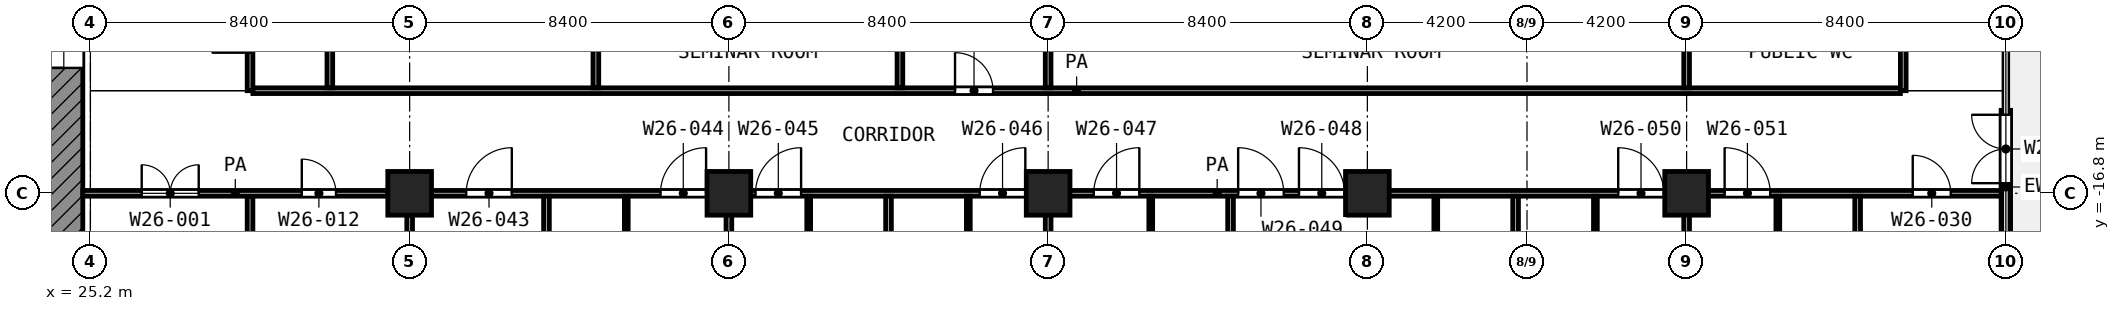
"""IFC4 building model, lengths in metres.
Left out: names, types, materials, properties, quantities, classifications, styles, units other than length and angle.
Written with IfcOpenShell. Run it as: python <this file> out.ifc"""

import sys

from ifc_helpers import new_model, si_unit, direction, frame, frame_2d, origin, origin_2d, place, context, subcontext, project, spatial, rectangle, extrude, element, fill, save


model = new_model("IFC4")
c1 = context("Model", 3, precision=1e-05, world=origin(), true_north=direction((0.0, 1.0)))
c2 = subcontext(c1, "Body", "Model", "MODEL_VIEW")
j1 = project(units=[si_unit("LENGTHUNIT", "METRE"), si_unit("PLANEANGLEUNIT", "RADIAN")], contexts=[c1])
p1 = place(None, origin())
s1 = spatial("IfcSite", under=j1, at=p1, CompositionType="ELEMENT")
p2 = place(p1, origin())
s2 = spatial("IfcBuilding", under=s1, at=p2, CompositionType="ELEMENT")
p3 = place(p2, frame((0.0, 0.0, 115.6)))
s3 = spatial("IfcBuildingStorey", under=s2, at=p3, CompositionType="ELEMENT", Elevation=115.6)
for number, where, z_axis, x_axis in (
    (1, (33.6, -16.8, 0.0), (0.0, 0.0, 1.0), (1.0, 0.0, 0.0)),
    (2, (42.0, -16.8, 0.0), (0.0, 0.0, 1.0), (1.0, 0.0, 0.0)),
    (3, (50.4, -16.8, 0.0), (0.0, 0.0, 1.0), (1.0, 0.0, 0.0)),
    (4, (58.8, -16.8, 0.0), (0.0, 0.0, 1.0), (1.0, 0.0, 0.0)),
    (5, (67.2, -16.8, 0.0), (0.0, 0.0, 1.0), (1.0, 0.0, 0.0)),
):
    element("IfcColumn", number, at=place(p3, frame(where, z_axis=z_axis, x_axis=x_axis)), inside=s3, PredefinedType="COLUMN", context=c2, shape_type="SweptSolid", body=[
        extrude(rectangle(XDim=1.15, YDim=1.15, at=origin_2d()), origin(), (0.0, 0.0, 1.0), 4.2),
    ])
p4 = place(p3, frame((75.6, -18.65, 0.0), z_axis=(0.0, 0.0, 1.0), x_axis=(0.0, 1.0, 0.0)))
e6 = element("IfcWall", 6, at=p4, inside=s3, PredefinedType="SOLIDWALL", context=c2, shape_type="SweptSolid", body=[
    extrude(rectangle(XDim=4.033, YDim=0.25, at=frame_2d((2.017, 0.0))), origin(), (0.0, 0.0, 1.0), 3.48),
])
p5 = place(p4, frame((2.117, 0.0, 0.0)))
e7 = element("IfcOpeningElement", 7, at=p5, cuts=e6, PredefinedType="OPENING", context=c2, shape_type="SweptSolid", body=[
    extrude(rectangle(XDim=1.8, YDim=2.1, at=frame_2d((0.9, 1.05))), frame((0.0, 0.135, 0.0), z_axis=(0.0, -1.0, 0.0), x_axis=(1.0, 0.0, 0.0)), (0.0, 0.0, 1.0), 0.27),
])
p6 = place(p3, frame((24.5, -24.0, 0.0), z_axis=(0.0, 0.0, 1.0), x_axis=(0.0, 1.0, 0.0)))
e8 = element("IfcWall", 8, at=p6, inside=s3, PredefinedType="SHEAR", context=c2, shape_type="SweptSolid", body=[
    extrude(rectangle(XDim=18.6, YDim=1.0, at=frame_2d((9.3, 0.0))), origin(), (0.0, 0.0, 1.0), 3.6),
])
p7 = place(p6, frame((10.5, 0.0, 0.0)))
e9 = element("IfcOpeningElement", 9, at=p7, cuts=e8, PredefinedType="OPENING", context=c2, shape_type="SweptSolid", body=[
    extrude(rectangle(XDim=1.8, YDim=2.1, at=frame_2d((0.9, 1.05))), frame((0.0, 0.51, 0.0), z_axis=(0.0, -1.0, 0.0), x_axis=(1.0, 0.0, 0.0)), (0.0, 0.0, 1.0), 1.02),
])
for number, where, z_axis, x_axis in (
    (10, (39.3, -20.1, 0.0), (0.0, 0.0, 1.0), (0.0, 1.0, 0.0)),
    (11, (44.1, -20.1, 0.0), (0.0, 0.0, 1.0), (0.0, 1.0, 0.0)),
    (12, (48.3, -20.1, 0.0), (0.0, 0.0, 1.0), (0.0, 1.0, 0.0)),
):
    element("IfcWall", number, at=place(p3, frame(where, z_axis=z_axis, x_axis=x_axis)), inside=s3, PredefinedType="PARTITIONING", context=c2, shape_type="SweptSolid", body=[
        extrude(rectangle(XDim=3.225, YDim=0.1, at=frame_2d((1.613, 0.0))), origin(), (0.0, 0.0, 1.0), 3.6),
    ])
p8 = place(p3, frame((53.1, -19.5, 0.0), z_axis=(0.0, 0.0, 1.0), x_axis=(0.0, 1.0, 0.0)))
e13 = element("IfcWall", 13, at=p8, inside=s3, PredefinedType="PARTITIONING", context=c2, shape_type="SweptSolid", body=[
    extrude(rectangle(XDim=2.625, YDim=0.1, at=frame_2d((1.312, 0.0))), origin(), (0.0, 0.0, 1.0), 3.6),
])
p9 = place(p3, frame((60.6, -20.099, 0.0), z_axis=(0.0, 0.0, 1.0), x_axis=(0.0, 1.0, 0.0)))
e14 = element("IfcWall", 14, at=p9, inside=s3, PredefinedType="PARTITIONING", context=c2, shape_type="SweptSolid", body=[
    extrude(rectangle(XDim=3.224, YDim=0.1, at=frame_2d((1.612, 0.0))), origin(), (0.0, 0.0, 1.0), 3.6),
])
for number, where, z_axis, x_axis in (
    (15, (64.8, -20.1, 0.0), (0.0, 0.0, 1.0), (0.0, 1.0, 0.0)),
    (16, (69.6, -20.1, 0.0), (0.0, 0.0, 1.0), (0.0, 1.0, 0.0)),
):
    element("IfcWall", number, at=place(p3, frame(where, z_axis=z_axis, x_axis=x_axis)), inside=s3, PredefinedType="PARTITIONING", context=c2, shape_type="SweptSolid", body=[
        extrude(rectangle(XDim=3.225, YDim=0.1, at=frame_2d((1.613, 0.0))), origin(), (0.0, 0.0, 1.0), 3.6),
    ])
p10 = place(p3, frame((25.0, -16.8, 0.0), z_axis=(0.0, 0.0, 1.0), x_axis=(1.0, 0.0, 0.0)))
e17 = element("IfcWall", 17, at=p10, inside=s3, PredefinedType="PARTITIONING", context=c2, shape_type="SweptSolid", body=[
    extrude(rectangle(XDim=8.025, YDim=0.15, at=frame_2d((4.012, 0.0))), origin(), (0.0, 0.0, 1.0), 3.6),
])
p11 = place(p10, frame((1.55, 0.0, 0.0)))
e18 = element("IfcOpeningElement", 18, at=p11, cuts=e17, PredefinedType="OPENING", context=c2, shape_type="SweptSolid", body=[
    extrude(rectangle(XDim=1.5, YDim=2.1, at=frame_2d((0.75, 1.05))), frame((0.0, 0.085, 0.0), z_axis=(0.0, -1.0, 0.0), x_axis=(1.0, 0.0, 0.0)), (0.0, 0.0, 1.0), 0.17),
])
p12 = place(p10, frame((5.762, 0.0, 0.0)))
e19 = element("IfcOpeningElement", 19, at=p12, cuts=e17, PredefinedType="OPENING", context=c2, shape_type="SweptSolid", body=[
    extrude(rectangle(XDim=0.9, YDim=2.1, at=frame_2d((0.45, 1.05))), frame((0.0, 0.085, 0.0), z_axis=(0.0, -1.0, 0.0), x_axis=(1.0, 0.0, 0.0)), (0.0, 0.0, 1.0), 0.17),
])
p13 = place(p3, frame((34.175, -16.8, 0.0), z_axis=(0.0, 0.0, 1.0), x_axis=(1.0, 0.0, 0.0)))
e20 = element("IfcWall", 20, at=p13, inside=s3, PredefinedType="PARTITIONING", context=c2, shape_type="SweptSolid", body=[
    extrude(rectangle(XDim=41.345, YDim=0.15, at=frame_2d((20.672, 0.0))), origin(), (0.0, 0.0, 1.0), 3.6),
])
p14 = place(p13, frame((0.913, 0.0, 0.0)))
e21 = element("IfcOpeningElement", 21, at=p14, cuts=e20, PredefinedType="OPENING", context=c2, shape_type="SweptSolid", body=[
    extrude(rectangle(XDim=1.2, YDim=2.1, at=frame_2d((0.6, 1.05))), frame((0.0, 0.085, 0.0), z_axis=(0.0, -1.0, 0.0), x_axis=(1.0, 0.0, 0.0)), (0.0, 0.0, 1.0), 0.17),
])
p15 = place(p13, frame((6.025, 0.0, 0.0)))
e22 = element("IfcOpeningElement", 22, at=p15, cuts=e20, PredefinedType="OPENING", context=c2, shape_type="SweptSolid", body=[
    extrude(rectangle(XDim=1.2, YDim=2.1, at=frame_2d((0.6, 1.05))), frame((0.0, 0.085, 0.0), z_axis=(0.0, -1.0, 0.0), x_axis=(1.0, 0.0, 0.0)), (0.0, 0.0, 1.0), 0.17),
])
p16 = place(p13, frame((8.525, 0.0, 0.0)))
e23 = element("IfcOpeningElement", 23, at=p16, cuts=e20, PredefinedType="OPENING", context=c2, shape_type="SweptSolid", body=[
    extrude(rectangle(XDim=1.2, YDim=2.1, at=frame_2d((0.6, 1.05))), frame((0.0, 0.085, 0.0), z_axis=(0.0, -1.0, 0.0), x_axis=(1.0, 0.0, 0.0)), (0.0, 0.0, 1.0), 0.17),
])
p17 = place(p13, frame((14.425, 0.0, 0.0)))
e24 = element("IfcOpeningElement", 24, at=p17, cuts=e20, PredefinedType="OPENING", context=c2, shape_type="SweptSolid", body=[
    extrude(rectangle(XDim=1.2, YDim=2.1, at=frame_2d((0.6, 1.05))), frame((0.0, 0.085, 0.0), z_axis=(0.0, -1.0, 0.0), x_axis=(1.0, 0.0, 0.0)), (0.0, 0.0, 1.0), 0.17),
])
p18 = place(p13, frame((17.425, 0.0, 0.0)))
e25 = element("IfcOpeningElement", 25, at=p18, cuts=e20, PredefinedType="OPENING", context=c2, shape_type="SweptSolid", body=[
    extrude(rectangle(XDim=1.2, YDim=2.1, at=frame_2d((0.6, 1.05))), frame((0.0, 0.085, 0.0), z_axis=(0.0, -1.0, 0.0), x_axis=(1.0, 0.0, 0.0)), (0.0, 0.0, 1.0), 0.17),
])
p19 = place(p13, frame((22.825, 0.0, 0.0)))
e26 = element("IfcOpeningElement", 26, at=p19, cuts=e20, PredefinedType="OPENING", context=c2, shape_type="SweptSolid", body=[
    extrude(rectangle(XDim=1.2, YDim=2.1, at=frame_2d((0.6, 1.05))), frame((0.0, 0.085, 0.0), z_axis=(0.0, -1.0, 0.0), x_axis=(1.0, 0.0, 0.0)), (0.0, 0.0, 1.0), 0.17),
])
p20 = place(p13, frame((21.225, 0.0, 0.0)))
e27 = element("IfcOpeningElement", 27, at=p20, cuts=e20, PredefinedType="OPENING", context=c2, shape_type="SweptSolid", body=[
    extrude(rectangle(XDim=1.2, YDim=2.1, at=frame_2d((0.6, 1.05))), frame((0.0, 0.085, 0.0), z_axis=(0.0, -1.0, 0.0), x_axis=(1.0, 0.0, 0.0)), (0.0, 0.0, 1.0), 0.17),
])
p21 = place(p13, frame((31.225, 0.0, 0.0)))
e28 = element("IfcOpeningElement", 28, at=p21, cuts=e20, PredefinedType="OPENING", context=c2, shape_type="SweptSolid", body=[
    extrude(rectangle(XDim=1.2, YDim=2.1, at=frame_2d((0.6, 1.05))), frame((0.0, 0.085, 0.0), z_axis=(0.0, -1.0, 0.0), x_axis=(1.0, 0.0, 0.0)), (0.0, 0.0, 1.0), 0.17),
])
p22 = place(p13, frame((34.025, 0.0, 0.0)))
e29 = element("IfcOpeningElement", 29, at=p22, cuts=e20, PredefinedType="OPENING", context=c2, shape_type="SweptSolid", body=[
    extrude(rectangle(XDim=1.2, YDim=2.1, at=frame_2d((0.6, 1.05))), frame((0.0, 0.085, 0.0), z_axis=(0.0, -1.0, 0.0), x_axis=(1.0, 0.0, 0.0)), (0.0, 0.0, 1.0), 0.17),
])
p23 = place(p13, frame((38.975, 0.0, 0.0)))
e30 = element("IfcOpeningElement", 30, at=p23, cuts=e20, PredefinedType="OPENING", context=c2, shape_type="SweptSolid", body=[
    extrude(rectangle(XDim=1.0, YDim=2.1, at=frame_2d((0.5, 1.05))), frame((0.0, 0.085, 0.0), z_axis=(0.0, -1.0, 0.0), x_axis=(1.0, 0.0, 0.0)), (0.0, 0.0, 1.0), 0.17),
])
p24 = place(p3, frame((29.475, -14.1, 0.0), z_axis=(0.0, 0.0, 1.0), x_axis=(1.0, 0.0, 0.0)))
e31 = element("IfcWall", 31, at=p24, inside=s3, PredefinedType="PARTITIONING", context=c2, shape_type="SweptSolid", body=[
    extrude(rectangle(XDim=43.35, YDim=0.15, at=frame_2d((21.675, 0.0))), origin(), (0.0, 0.0, 1.0), 3.6),
])
p25 = place(p24, frame((18.475, 0.0, 0.0)))
e32 = element("IfcOpeningElement", 32, at=p25, cuts=e31, PredefinedType="OPENING", context=c2, shape_type="SweptSolid", body=[
    extrude(rectangle(XDim=1.0, YDim=2.1, at=frame_2d((0.5, 1.05))), frame((0.0, 0.085, 0.0), z_axis=(0.0, -1.0, 0.0), x_axis=(1.0, 0.0, 0.0)), (0.0, 0.0, 1.0), 0.17),
])
p26 = place(p3, frame((29.4, -25.2, 0.0), z_axis=(0.0, 0.0, 1.0), x_axis=(0.0, 1.0, 0.0)))
e33 = element("IfcWall", 33, at=p26, inside=s3, PredefinedType="PARTITIONING", context=c2, shape_type="SweptSolid", body=[
    extrude(rectangle(XDim=8.325, YDim=0.15, at=frame_2d((4.163, 0.0))), origin(), (0.0, 0.0, 1.0), 3.6),
])
p27 = place(p3, frame((29.4, -14.1, 0.0), z_axis=(0.0, 0.0, 1.0), x_axis=(0.0, 1.0, 0.0)))
e34 = element("IfcWall", 34, at=p27, inside=s3, PredefinedType="PARTITIONING", context=c2, shape_type="SweptSolid", body=[
    extrude(rectangle(XDim=3.0, YDim=0.15, at=frame_2d((1.5, 0.0))), origin(), (0.0, 0.0, 1.0), 3.6),
])
p28 = place(p27, frame((1.0, 0.0, 0.0)))
e35 = element("IfcOpeningElement", 35, at=p28, cuts=e34, PredefinedType="OPENING", context=c2, shape_type="SweptSolid", body=[
    extrude(rectangle(XDim=1.0, YDim=2.1, at=frame_2d((0.5, 1.05))), frame((0.0, 0.085, 0.0), z_axis=(0.0, -1.0, 0.0), x_axis=(1.0, 0.0, 0.0)), (0.0, 0.0, 1.0), 0.17),
])
p29 = place(p3, frame((31.5, -14.025, 0.0), z_axis=(0.0, 0.0, 1.0), x_axis=(0.0, 1.0, 0.0)))
e36 = element("IfcWall", 36, at=p29, inside=s3, PredefinedType="PARTITIONING", context=c2, shape_type="SweptSolid", body=[
    extrude(rectangle(XDim=2.85, YDim=0.15, at=frame_2d((1.425, 0.0))), origin(), (0.0, 0.0, 1.0), 3.6),
])
p30 = place(p3, frame((33.6, -25.12, 0.0), z_axis=(0.0, 0.0, 1.0), x_axis=(0.0, 1.0, 0.0)))
e37 = element("IfcWall", 37, at=p30, inside=s3, PredefinedType="PARTITIONING", context=c2, shape_type="SweptSolid", body=[
    extrude(rectangle(XDim=7.745, YDim=0.15, at=frame_2d((3.873, 0.0))), origin(), (0.0, 0.0, 1.0), 2.7),
])
p31 = place(p3, frame((37.2, -25.12, 0.0), z_axis=(0.0, 0.0, 1.0), x_axis=(0.0, 1.0, 0.0)))
e38 = element("IfcWall", 38, at=p31, inside=s3, PredefinedType="PARTITIONING", context=c2, shape_type="SweptSolid", body=[
    extrude(rectangle(XDim=8.245, YDim=0.15, at=frame_2d((4.123, 0.0))), origin(), (0.0, 0.0, 1.0), 2.7),
])
p32 = place(p3, frame((38.5, -14.025, 0.0), z_axis=(0.0, 0.0, 1.0), x_axis=(0.0, 1.0, 0.0)))
e39 = element("IfcWall", 39, at=p32, inside=s3, PredefinedType="PARTITIONING", context=c2, shape_type="SweptSolid", body=[
    extrude(rectangle(XDim=2.85, YDim=0.15, at=frame_2d((1.425, 0.0))), origin(), (0.0, 0.0, 1.0), 3.6),
])
p33 = place(p3, frame((42.0, -25.12, 0.0), z_axis=(0.0, 0.0, 1.0), x_axis=(0.0, 1.0, 0.0)))
e40 = element("IfcWall", 40, at=p33, inside=s3, PredefinedType="PARTITIONING", context=c2, shape_type="SweptSolid", body=[
    extrude(rectangle(XDim=8.245, YDim=0.15, at=frame_2d((4.123, 0.0))), origin(), (0.0, 0.0, 1.0), 3.6),
])
p34 = place(p3, frame((46.2, -25.12, 0.0), z_axis=(0.0, 0.0, 1.0), x_axis=(0.0, 1.0, 0.0)))
e41 = element("IfcWall", 41, at=p34, inside=s3, PredefinedType="PARTITIONING", context=c2, shape_type="SweptSolid", body=[
    extrude(rectangle(XDim=8.245, YDim=0.15, at=frame_2d((4.123, 0.0))), origin(), (0.0, 0.0, 1.0), 2.7),
])
p35 = place(p3, frame((46.5, -14.025, 0.0), z_axis=(0.0, 0.0, 1.0), x_axis=(0.0, 1.0, 0.0)))
e42 = element("IfcWall", 42, at=p35, inside=s3, PredefinedType="PARTITIONING", context=c2, shape_type="SweptSolid", body=[
    extrude(rectangle(XDim=2.85, YDim=0.15, at=frame_2d((1.425, 0.0))), origin(), (0.0, 0.0, 1.0), 3.6),
])
p36 = place(p3, frame((50.4, -25.12, 0.0), z_axis=(0.0, 0.0, 1.0), x_axis=(0.0, 1.0, 0.0)))
e43 = element("IfcWall", 43, at=p36, inside=s3, PredefinedType="PARTITIONING", context=c2, shape_type="SweptSolid", body=[
    extrude(rectangle(XDim=8.245, YDim=0.15, at=frame_2d((4.123, 0.0))), origin(), (0.0, 0.0, 1.0), 3.6),
])
p37 = place(p3, frame((50.4, -14.025, 0.0), z_axis=(0.0, 0.0, 1.0), x_axis=(0.0, 1.0, 0.0)))
e44 = element("IfcWall", 44, at=p37, inside=s3, PredefinedType="PARTITIONING", context=c2, shape_type="SweptSolid", body=[
    extrude(rectangle(XDim=2.85, YDim=0.15, at=frame_2d((1.425, 0.0))), origin(), (0.0, 0.0, 1.0), 3.6),
])
for number, where, z_axis, x_axis in (
    (45, (55.2, -25.12, 0.0), (0.0, 0.0, 1.0), (0.0, 1.0, 0.0)),
    (46, (62.7, -25.12, 0.0), (0.0, 0.0, 1.0), (0.0, 1.0, 0.0)),
    (47, (67.2, -25.12, 0.0), (0.0, 0.0, 1.0), (0.0, 1.0, 0.0)),
):
    element("IfcWall", number, at=place(p3, frame(where, z_axis=z_axis, x_axis=x_axis)), inside=s3, PredefinedType="PARTITIONING", context=c2, shape_type="SweptSolid", body=[
        extrude(rectangle(XDim=8.245, YDim=0.15, at=frame_2d((4.123, 0.0))), origin(), (0.0, 0.0, 1.0), 2.7),
    ])
p38 = place(p3, frame((67.2, -14.025, 0.0), z_axis=(0.0, 0.0, 1.0), x_axis=(0.0, 1.0, 0.0)))
e48 = element("IfcWall", 48, at=p38, inside=s3, PredefinedType="PARTITIONING", context=c2, shape_type="SweptSolid", body=[
    extrude(rectangle(XDim=2.85, YDim=0.15, at=frame_2d((1.425, 0.0))), origin(), (0.0, 0.0, 1.0), 3.6),
])
p39 = place(p3, frame((71.7, -22.987, 0.0), z_axis=(0.0, 0.0, 1.0), x_axis=(0.0, 1.0, 0.0)))
e49 = element("IfcWall", 49, at=p39, inside=s3, PredefinedType="PARTITIONING", context=c2, shape_type="SweptSolid", body=[
    extrude(rectangle(XDim=6.112, YDim=0.15, at=frame_2d((3.056, 0.0))), origin(), (0.0, 0.0, 1.0), 2.7),
])
p40 = place(p3, frame((72.9, -14.1, 0.0), z_axis=(0.0, 0.0, 1.0), x_axis=(0.0, 1.0, 0.0)))
e50 = element("IfcWall", 50, at=p40, inside=s3, PredefinedType="PARTITIONING", context=c2, shape_type="SweptSolid", body=[
    extrude(rectangle(XDim=3.0, YDim=0.15, at=frame_2d((1.5, 0.0))), origin(), (0.0, 0.0, 1.0), 3.6),
])
p41 = place(p5, origin())
e51 = element("IfcDoor", 51, at=p41, inside=s3, OperationType="DOUBLE_DOOR_SINGLE_SWING", PredefinedType="DOOR", context=c2, shape_type="SweptSolid", body=[
    extrude(rectangle(XDim=1.8, YDim=2.1, at=frame_2d((0.9, 1.05))), frame((0.0, 0.025, 0.0), z_axis=(0.0, -1.0, 0.0), x_axis=(1.0, 0.0, 0.0)), (0.0, 0.0, 1.0), 0.05),
])
fill(e7, e51)
p42 = place(p7, origin())
e52 = element("IfcDoor", 52, at=p42, inside=s3, OperationType="DOUBLE_DOOR_SINGLE_SWING", PredefinedType="DOOR", context=c2, shape_type="SweptSolid", body=[
    extrude(rectangle(XDim=1.8, YDim=2.1, at=frame_2d((0.9, 1.05))), frame((0.0, 0.025, 0.0), z_axis=(0.0, -1.0, 0.0), x_axis=(1.0, 0.0, 0.0)), (0.0, 0.0, 1.0), 0.05),
])
fill(e9, e52)
p43 = place(p11, origin())
e53 = element("IfcDoor", 53, at=p43, inside=s3, OperationType="DOUBLE_DOOR_SINGLE_SWING", PredefinedType="DOOR", context=c2, shape_type="SweptSolid", body=[
    extrude(rectangle(XDim=1.5, YDim=2.1, at=frame_2d((0.75, 1.05))), frame((0.0, 0.025, 0.0), z_axis=(0.0, -1.0, 0.0), x_axis=(1.0, 0.0, 0.0)), (0.0, 0.0, 1.0), 0.05),
])
fill(e18, e53)
p44 = place(p25, origin())
e54 = element("IfcDoor", 54, at=p44, inside=s3, OperationType="SINGLE_SWING_LEFT", PredefinedType="DOOR", context=c2, shape_type="SweptSolid", body=[
    extrude(rectangle(XDim=1.0, YDim=2.1, at=frame_2d((0.5, 1.05))), frame((0.0, 0.025, 0.0), z_axis=(0.0, -1.0, 0.0), x_axis=(1.0, 0.0, 0.0)), (0.0, 0.0, 1.0), 0.05),
])
fill(e32, e54)
p45 = place(p12, origin())
e55 = element("IfcDoor", 55, at=p45, inside=s3, OperationType="SINGLE_SWING_LEFT", PredefinedType="DOOR", context=c2, shape_type="SweptSolid", body=[
    extrude(rectangle(XDim=0.9, YDim=2.1, at=frame_2d((0.45, 1.05))), frame((0.0, 0.025, 0.0), z_axis=(0.0, -1.0, 0.0), x_axis=(1.0, 0.0, 0.0)), (0.0, 0.0, 1.0), 0.05),
])
fill(e19, e55)
p46 = place(p14, origin())
e56 = element("IfcDoor", 56, at=p46, inside=s3, OperationType="SINGLE_SWING_RIGHT", PredefinedType="DOOR", context=c2, shape_type="SweptSolid", body=[
    extrude(rectangle(XDim=1.2, YDim=2.1, at=frame_2d((0.6, 1.05))), frame((0.0, 0.025, 0.0), z_axis=(0.0, -1.0, 0.0), x_axis=(1.0, 0.0, 0.0)), (0.0, 0.0, 1.0), 0.05),
])
fill(e21, e56)
p47 = place(p15, origin())
e57 = element("IfcDoor", 57, at=p47, inside=s3, OperationType="SINGLE_SWING_RIGHT", PredefinedType="DOOR", context=c2, shape_type="SweptSolid", body=[
    extrude(rectangle(XDim=1.2, YDim=2.1, at=frame_2d((0.6, 1.05))), frame((0.0, 0.025, 0.0), z_axis=(0.0, -1.0, 0.0), x_axis=(1.0, 0.0, 0.0)), (0.0, 0.0, 1.0), 0.05),
])
fill(e22, e57)
p48 = place(p16, origin())
e58 = element("IfcDoor", 58, at=p48, inside=s3, OperationType="SINGLE_SWING_RIGHT", PredefinedType="DOOR", context=c2, shape_type="SweptSolid", body=[
    extrude(rectangle(XDim=1.2, YDim=2.1, at=frame_2d((0.6, 1.05))), frame((0.0, 0.025, 0.0), z_axis=(0.0, -1.0, 0.0), x_axis=(1.0, 0.0, 0.0)), (0.0, 0.0, 1.0), 0.05),
])
fill(e23, e58)
p49 = place(p17, origin())
e59 = element("IfcDoor", 59, at=p49, inside=s3, OperationType="SINGLE_SWING_RIGHT", PredefinedType="DOOR", context=c2, shape_type="SweptSolid", body=[
    extrude(rectangle(XDim=1.2, YDim=2.1, at=frame_2d((0.6, 1.05))), frame((0.0, 0.025, 0.0), z_axis=(0.0, -1.0, 0.0), x_axis=(1.0, 0.0, 0.0)), (0.0, 0.0, 1.0), 0.05),
])
fill(e24, e59)
p50 = place(p18, origin())
e60 = element("IfcDoor", 60, at=p50, inside=s3, OperationType="SINGLE_SWING_RIGHT", PredefinedType="DOOR", context=c2, shape_type="SweptSolid", body=[
    extrude(rectangle(XDim=1.2, YDim=2.1, at=frame_2d((0.6, 1.05))), frame((0.0, 0.025, 0.0), z_axis=(0.0, -1.0, 0.0), x_axis=(1.0, 0.0, 0.0)), (0.0, 0.0, 1.0), 0.05),
])
fill(e25, e60)
p51 = place(p19, origin())
e61 = element("IfcDoor", 61, at=p51, inside=s3, OperationType="SINGLE_SWING_LEFT", PredefinedType="DOOR", context=c2, shape_type="SweptSolid", body=[
    extrude(rectangle(XDim=1.2, YDim=2.1, at=frame_2d((0.6, 1.05))), frame((0.0, 0.025, 0.0), z_axis=(0.0, -1.0, 0.0), x_axis=(1.0, 0.0, 0.0)), (0.0, 0.0, 1.0), 0.05),
])
fill(e26, e61)
p52 = place(p20, origin())
e62 = element("IfcDoor", 62, at=p52, inside=s3, OperationType="SINGLE_SWING_LEFT", PredefinedType="DOOR", context=c2, shape_type="SweptSolid", body=[
    extrude(rectangle(XDim=1.2, YDim=2.1, at=frame_2d((0.6, 1.05))), frame((0.0, 0.025, 0.0), z_axis=(0.0, -1.0, 0.0), x_axis=(1.0, 0.0, 0.0)), (0.0, 0.0, 1.0), 0.05),
])
fill(e27, e62)
p53 = place(p21, origin())
e63 = element("IfcDoor", 63, at=p53, inside=s3, OperationType="SINGLE_SWING_LEFT", PredefinedType="DOOR", context=c2, shape_type="SweptSolid", body=[
    extrude(rectangle(XDim=1.2, YDim=2.1, at=frame_2d((0.6, 1.05))), frame((0.0, 0.025, 0.0), z_axis=(0.0, -1.0, 0.0), x_axis=(1.0, 0.0, 0.0)), (0.0, 0.0, 1.0), 0.05),
])
fill(e28, e63)
p54 = place(p22, origin())
e64 = element("IfcDoor", 64, at=p54, inside=s3, OperationType="SINGLE_SWING_LEFT", PredefinedType="DOOR", context=c2, shape_type="SweptSolid", body=[
    extrude(rectangle(XDim=1.2, YDim=2.1, at=frame_2d((0.6, 1.05))), frame((0.0, 0.025, 0.0), z_axis=(0.0, -1.0, 0.0), x_axis=(1.0, 0.0, 0.0)), (0.0, 0.0, 1.0), 0.05),
])
fill(e29, e64)
p55 = place(p23, origin())
e65 = element("IfcDoor", 65, at=p55, inside=s3, OperationType="SINGLE_SWING_LEFT", PredefinedType="DOOR", context=c2, shape_type="SweptSolid", body=[
    extrude(rectangle(XDim=1.0, YDim=2.1, at=frame_2d((0.5, 1.05))), frame((0.0, 0.025, 0.0), z_axis=(0.0, -1.0, 0.0), x_axis=(1.0, 0.0, 0.0)), (0.0, 0.0, 1.0), 0.05),
])
fill(e30, e65)
save(model, sys.argv[1])
